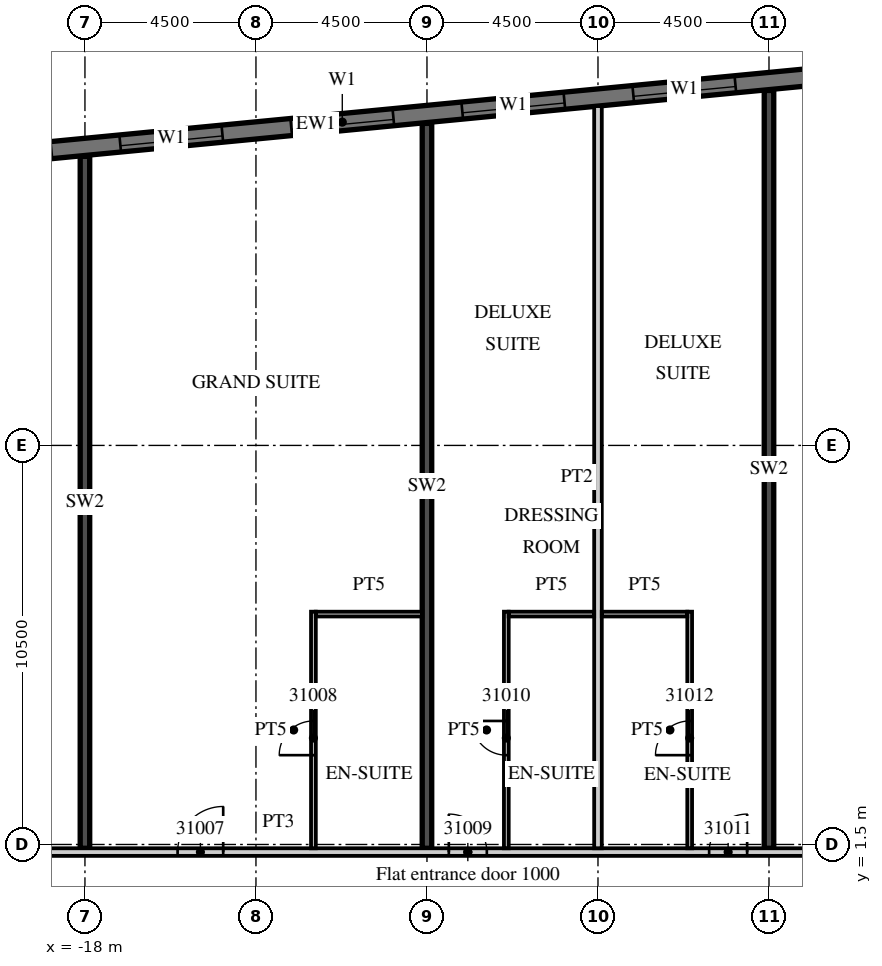
"""IFC4 building model, lengths in metres.
Left out: names, types, materials, properties, quantities, classifications, styles, units other than length and angle.
Written with IfcOpenShell. Run it as: python <this file> out.ifc"""

import sys

from ifc_helpers import new_model, si_unit, direction, frame, frame_2d, origin, place, context, subcontext, project, spatial, rectangle, extrude, element, fill, save


model = new_model("IFC4")
c1 = context("Model", 3, precision=1e-05, world=origin(), true_north=direction((0.0, 1.0)))
c2 = subcontext(c1, "Body", "Model", "MODEL_VIEW")
j1 = project(units=[si_unit("LENGTHUNIT", "METRE"), si_unit("PLANEANGLEUNIT", "RADIAN")], contexts=[c1])
p1 = place(None, origin())
s1 = spatial("IfcSite", under=j1, at=p1, CompositionType="ELEMENT")
p2 = place(p1, origin())
s2 = spatial("IfcBuilding", under=s1, at=p2, CompositionType="ELEMENT")
p3 = place(p2, frame((0.0, 0.0, 137.2)))
s3 = spatial("IfcBuildingStorey", under=s2, at=p3, CompositionType="ELEMENT", Elevation=137.2)
p4 = place(p3, frame((-18.0, 1.4, 0.0), z_axis=(0.0, 0.0, 1.0), x_axis=(0.0, 1.0, 0.0)))
e1 = element("IfcWall", 1, at=p4, inside=s3, PredefinedType="SHEAR", context=c2, shape_type="SweptSolid", body=[
    extrude(rectangle(XDim=18.207, YDim=0.25, at=frame_2d((9.104, 0.0))), origin(), (0.0, 0.0, 1.0), 3.3),
])
p5 = place(p3, frame((-9.0, 1.4, 0.0), z_axis=(0.0, 0.0, 1.0), x_axis=(0.0, 1.0, 0.0)))
e2 = element("IfcWall", 2, at=p5, inside=s3, PredefinedType="SHEAR", context=c2, shape_type="SweptSolid", body=[
    extrude(rectangle(XDim=19.073, YDim=0.25, at=frame_2d((9.537, 0.0))), origin(), (0.0, 0.0, 1.0), 3.3),
])
p6 = place(p3, frame((0.0, 1.4, 0.0), z_axis=(0.0, 0.0, 1.0), x_axis=(0.0, 1.0, 0.0)))
e3 = element("IfcWall", 3, at=p6, inside=s3, PredefinedType="SHEAR", context=c2, shape_type="SweptSolid", body=[
    extrude(rectangle(XDim=19.94, YDim=0.25, at=frame_2d((9.97, 0.0))), origin(), (0.0, 0.0, 1.0), 3.3),
])
p7 = place(p3, frame((13.521, 22.89, 0.0), z_axis=(0.0, 0.0, 1.0), x_axis=(-0.995396445054, -0.095843190545, 0.0)))
e4 = element("IfcWall", 4, at=p7, inside=s3, PredefinedType="SOLIDWALL", context=c2, shape_type="SweptSolid", body=[
    extrude(rectangle(XDim=51.114, YDim=0.45, at=frame_2d((25.557, 0.0))), origin(), (0.0, 0.0, 1.0), 3.02),
])
p8 = place(p7, frame((0.91, 0.0, 0.45)))
e5 = element("IfcOpeningElement", 5, at=p8, cuts=e4, PredefinedType="OPENING", context=c2, shape_type="SweptSolid", body=[
    extrude(rectangle(XDim=2.7, YDim=2.25, at=frame_2d((1.35, 1.125))), frame((0.0, 0.235, 0.0), z_axis=(0.0, -1.0, 0.0), x_axis=(1.0, 0.0, 0.0)), (0.0, 0.0, 1.0), 0.47),
])
p9 = place(p7, frame((5.431, 0.0, 0.45)))
e6 = element("IfcOpeningElement", 6, at=p9, cuts=e4, PredefinedType="OPENING", context=c2, shape_type="SweptSolid", body=[
    extrude(rectangle(XDim=2.7, YDim=2.25, at=frame_2d((1.35, 1.125))), frame((0.0, 0.235, 0.0), z_axis=(0.0, -1.0, 0.0), x_axis=(1.0, 0.0, 0.0)), (0.0, 0.0, 1.0), 0.47),
])
p10 = place(p7, frame((9.952, 0.0, 0.45)))
e7 = element("IfcOpeningElement", 7, at=p10, cuts=e4, PredefinedType="OPENING", context=c2, shape_type="SweptSolid", body=[
    extrude(rectangle(XDim=2.7, YDim=2.25, at=frame_2d((1.35, 1.125))), frame((0.0, 0.235, 0.0), z_axis=(0.0, -1.0, 0.0), x_axis=(1.0, 0.0, 0.0)), (0.0, 0.0, 1.0), 0.47),
])
p11 = place(p7, frame((14.473, 0.0, 0.45)))
e8 = element("IfcOpeningElement", 8, at=p11, cuts=e4, PredefinedType="OPENING", context=c2, shape_type="SweptSolid", body=[
    extrude(rectangle(XDim=2.7, YDim=2.25, at=frame_2d((1.35, 1.125))), frame((0.0, 0.235, 0.0), z_axis=(0.0, -1.0, 0.0), x_axis=(1.0, 0.0, 0.0)), (0.0, 0.0, 1.0), 0.47),
])
p12 = place(p7, frame((18.994, 0.0, 0.45)))
e9 = element("IfcOpeningElement", 9, at=p12, cuts=e4, PredefinedType="OPENING", context=c2, shape_type="SweptSolid", body=[
    extrude(rectangle(XDim=2.7, YDim=2.25, at=frame_2d((1.35, 1.125))), frame((0.0, 0.235, 0.0), z_axis=(0.0, -1.0, 0.0), x_axis=(1.0, 0.0, 0.0)), (0.0, 0.0, 1.0), 0.47),
])
p13 = place(p7, frame((23.514, 0.0, 0.45)))
e10 = element("IfcOpeningElement", 10, at=p13, cuts=e4, PredefinedType="OPENING", context=c2, shape_type="SweptSolid", body=[
    extrude(rectangle(XDim=2.7, YDim=2.25, at=frame_2d((1.35, 1.125))), frame((0.0, 0.235, 0.0), z_axis=(0.0, -1.0, 0.0), x_axis=(1.0, 0.0, 0.0)), (0.0, 0.0, 1.0), 0.47),
])
p14 = place(p7, frame((28.035, 0.0, 0.45)))
e11 = element("IfcOpeningElement", 11, at=p14, cuts=e4, PredefinedType="OPENING", context=c2, shape_type="SweptSolid", body=[
    extrude(rectangle(XDim=2.7, YDim=2.25, at=frame_2d((1.35, 1.125))), frame((0.0, 0.235, 0.0), z_axis=(0.0, -1.0, 0.0), x_axis=(1.0, 0.0, 0.0)), (0.0, 0.0, 1.0), 0.47),
])
p15 = place(p7, frame((32.556, 0.0, 0.45)))
e12 = element("IfcOpeningElement", 12, at=p15, cuts=e4, PredefinedType="OPENING", context=c2, shape_type="SweptSolid", body=[
    extrude(rectangle(XDim=2.7, YDim=2.25, at=frame_2d((1.35, 1.125))), frame((0.0, 0.235, 0.0), z_axis=(0.0, -1.0, 0.0), x_axis=(1.0, 0.0, 0.0)), (0.0, 0.0, 1.0), 0.47),
])
p16 = place(p7, frame((37.077, 0.0, 0.45)))
e13 = element("IfcOpeningElement", 13, at=p16, cuts=e4, PredefinedType="OPENING", context=c2, shape_type="SweptSolid", body=[
    extrude(rectangle(XDim=2.7, YDim=2.25, at=frame_2d((1.35, 1.125))), frame((0.0, 0.235, 0.0), z_axis=(0.0, -1.0, 0.0), x_axis=(1.0, 0.0, 0.0)), (0.0, 0.0, 1.0), 0.47),
])
p17 = place(p7, frame((41.598, 0.0, 0.45)))
e14 = element("IfcOpeningElement", 14, at=p17, cuts=e4, PredefinedType="OPENING", context=c2, shape_type="SweptSolid", body=[
    extrude(rectangle(XDim=2.7, YDim=2.25, at=frame_2d((1.35, 1.125))), frame((0.0, 0.235, 0.0), z_axis=(0.0, -1.0, 0.0), x_axis=(1.0, 0.0, 0.0)), (0.0, 0.0, 1.0), 0.47),
])
p18 = place(p7, frame((46.118, 0.0, 0.45)))
e15 = element("IfcOpeningElement", 15, at=p18, cuts=e4, PredefinedType="OPENING", context=c2, shape_type="SweptSolid", body=[
    extrude(rectangle(XDim=2.7, YDim=2.25, at=frame_2d((1.35, 1.125))), frame((0.0, 0.235, 0.0), z_axis=(0.0, -1.0, 0.0), x_axis=(1.0, 0.0, 0.0)), (0.0, 0.0, 1.0), 0.47),
])
p19 = place(p3, frame((-39.316, 1.3, 0.0), z_axis=(0.0, 0.0, 1.0), x_axis=(1.0, 0.0, 0.0)))
e16 = element("IfcWall", 16, at=p19, inside=s3, PredefinedType="PARTITIONING", context=c2, shape_type="SweptSolid", body=[
    extrude(rectangle(XDim=52.816, YDim=0.2, at=frame_2d((26.408, 0.0))), origin(), (0.0, 0.0, 1.0), 3.02),
])
p20 = place(p19, frame((0.15, 0.0, 0.0)))
e17 = element("IfcOpeningElement", 17, at=p20, cuts=e16, PredefinedType="OPENING", context=c2, shape_type="SweptSolid", body=[
    extrude(rectangle(XDim=0.9, YDim=2.1, at=frame_2d((0.45, 1.05))), frame((0.0, 0.11, 0.0), z_axis=(0.0, -1.0, 0.0), x_axis=(1.0, 0.0, 0.0)), (0.0, 0.0, 1.0), 0.22),
])
p21 = place(p19, frame((8.679, 0.0, 0.0)))
e18 = element("IfcOpeningElement", 18, at=p21, cuts=e16, PredefinedType="OPENING", context=c2, shape_type="SweptSolid", body=[
    extrude(rectangle(XDim=1.2, YDim=2.1, at=frame_2d((0.6, 1.05))), frame((0.0, 0.11, 0.0), z_axis=(0.0, -1.0, 0.0), x_axis=(1.0, 0.0, 0.0)), (0.0, 0.0, 1.0), 0.22),
])
p22 = place(p19, frame((17.678, 0.0, 0.0)))
e19 = element("IfcOpeningElement", 19, at=p22, cuts=e16, PredefinedType="OPENING", context=c2, shape_type="SweptSolid", body=[
    extrude(rectangle(XDim=1.2, YDim=2.1, at=frame_2d((0.6, 1.05))), frame((0.0, 0.11, 0.0), z_axis=(0.0, -1.0, 0.0), x_axis=(1.0, 0.0, 0.0)), (0.0, 0.0, 1.0), 0.22),
])
p23 = place(p19, frame((23.754, 0.0, 0.0)))
e20 = element("IfcOpeningElement", 20, at=p23, cuts=e16, PredefinedType="OPENING", context=c2, shape_type="SweptSolid", body=[
    extrude(rectangle(XDim=1.2, YDim=2.1, at=frame_2d((0.6, 1.05))), frame((0.0, 0.11, 0.0), z_axis=(0.0, -1.0, 0.0), x_axis=(1.0, 0.0, 0.0)), (0.0, 0.0, 1.0), 0.22),
])
p24 = place(p19, frame((30.891, 0.0, 0.0)))
e21 = element("IfcOpeningElement", 21, at=p24, cuts=e16, PredefinedType="OPENING", context=c2, shape_type="SweptSolid", body=[
    extrude(rectangle(XDim=1.0, YDim=2.1, at=frame_2d((0.5, 1.05))), frame((0.0, 0.11, 0.0), z_axis=(0.0, -1.0, 0.0), x_axis=(1.0, 0.0, 0.0)), (0.0, 0.0, 1.0), 0.22),
])
p25 = place(p19, frame((37.741, 0.0, 0.0)))
e22 = element("IfcOpeningElement", 22, at=p25, cuts=e16, PredefinedType="OPENING", context=c2, shape_type="SweptSolid", body=[
    extrude(rectangle(XDim=1.0, YDim=2.1, at=frame_2d((0.5, 1.05))), frame((0.0, 0.11, 0.0), z_axis=(0.0, -1.0, 0.0), x_axis=(1.0, 0.0, 0.0)), (0.0, 0.0, 1.0), 0.22),
])
p26 = place(p19, frame((41.754, 0.0, 0.0)))
e23 = element("IfcOpeningElement", 23, at=p26, cuts=e16, PredefinedType="OPENING", context=c2, shape_type="SweptSolid", body=[
    extrude(rectangle(XDim=1.2, YDim=2.1, at=frame_2d((0.6, 1.05))), frame((0.0, 0.11, 0.0), z_axis=(0.0, -1.0, 0.0), x_axis=(1.0, 0.0, 0.0)), (0.0, 0.0, 1.0), 0.22),
])
p27 = place(p19, frame((48.891, 0.0, 0.0)))
e24 = element("IfcOpeningElement", 24, at=p27, cuts=e16, PredefinedType="OPENING", context=c2, shape_type="SweptSolid", body=[
    extrude(rectangle(XDim=1.0, YDim=2.1, at=frame_2d((0.5, 1.05))), frame((0.0, 0.11, 0.0), z_axis=(0.0, -1.0, 0.0), x_axis=(1.0, 0.0, 0.0)), (0.0, 0.0, 1.0), 0.22),
])
p28 = place(p3, frame((-11.988, 1.4, 0.0), z_axis=(0.0, 0.0, 1.0), x_axis=(0.0, 1.0, 0.0)))
e25 = element("IfcWall", 25, at=p28, inside=s3, PredefinedType="PARTITIONING", context=c2, shape_type="SweptSolid", body=[
    extrude(rectangle(XDim=6.225, YDim=0.125, at=frame_2d((3.113, 0.0))), origin(), (0.0, 0.0, 1.0), 3.02),
])
p29 = place(p28, frame((2.45, 0.0, 0.0)))
e26 = element("IfcOpeningElement", 26, at=p29, cuts=e25, PredefinedType="OPENING", context=c2, shape_type="SweptSolid", body=[
    extrude(rectangle(XDim=0.9, YDim=2.1, at=frame_2d((0.45, 1.05))), frame((0.0, 0.073, 0.0), z_axis=(0.0, -1.0, 0.0), x_axis=(1.0, 0.0, 0.0)), (0.0, 0.0, 1.0), 0.145),
])
p30 = place(p3, frame((-11.925, 7.562, 0.0), z_axis=(0.0, 0.0, 1.0), x_axis=(1.0, 0.0, 0.0)))
e27 = element("IfcWall", 27, at=p30, inside=s3, PredefinedType="PARTITIONING", context=c2, shape_type="SweptSolid", body=[
    extrude(rectangle(XDim=2.8, YDim=0.125, at=frame_2d((1.4, 0.0))), origin(), (0.0, 0.0, 1.0), 3.02),
])
p31 = place(p3, frame((-4.5, 1.4, 0.0), z_axis=(0.0, 0.0, 1.0), x_axis=(0.0, 1.0, 0.0)))
e28 = element("IfcWall", 28, at=p31, inside=s3, PredefinedType="PARTITIONING", context=c2, shape_type="SweptSolid", body=[
    extrude(rectangle(XDim=19.529, YDim=0.2, at=frame_2d((9.765, 0.0))), origin(), (0.0, 0.0, 1.0), 3.02),
])
p32 = place(p3, frame((-6.912, 1.4, 0.0), z_axis=(0.0, 0.0, 1.0), x_axis=(0.0, 1.0, 0.0)))
e29 = element("IfcWall", 29, at=p32, inside=s3, PredefinedType="PARTITIONING", context=c2, shape_type="SweptSolid", body=[
    extrude(rectangle(XDim=6.225, YDim=0.125, at=frame_2d((3.113, 0.0))), origin(), (0.0, 0.0, 1.0), 3.02),
])
p33 = place(p32, frame((2.45, 0.0, 0.0)))
e30 = element("IfcOpeningElement", 30, at=p33, cuts=e29, PredefinedType="OPENING", context=c2, shape_type="SweptSolid", body=[
    extrude(rectangle(XDim=0.9, YDim=2.1, at=frame_2d((0.45, 1.05))), frame((0.0, 0.073, 0.0), z_axis=(0.0, -1.0, 0.0), x_axis=(1.0, 0.0, 0.0)), (0.0, 0.0, 1.0), 0.145),
])
p34 = place(p3, frame((-6.85, 7.562, 0.0), z_axis=(0.0, 0.0, 1.0), x_axis=(1.0, 0.0, 0.0)))
e31 = element("IfcWall", 31, at=p34, inside=s3, PredefinedType="PARTITIONING", context=c2, shape_type="SweptSolid", body=[
    extrude(rectangle(XDim=2.25, YDim=0.125, at=frame_2d((1.125, 0.0))), origin(), (0.0, 0.0, 1.0), 3.02),
])
p35 = place(p3, frame((-2.087, 1.4, 0.0), z_axis=(0.0, 0.0, 1.0), x_axis=(0.0, 1.0, 0.0)))
e32 = element("IfcWall", 32, at=p35, inside=s3, PredefinedType="PARTITIONING", context=c2, shape_type="SweptSolid", body=[
    extrude(rectangle(XDim=6.225, YDim=0.125, at=frame_2d((3.113, 0.0))), origin(), (0.0, 0.0, 1.0), 3.02),
])
p36 = place(p35, frame((2.45, 0.0, 0.0)))
e33 = element("IfcOpeningElement", 33, at=p36, cuts=e32, PredefinedType="OPENING", context=c2, shape_type="SweptSolid", body=[
    extrude(rectangle(XDim=0.9, YDim=2.1, at=frame_2d((0.45, 1.05))), frame((0.0, 0.073, 0.0), z_axis=(0.0, -1.0, 0.0), x_axis=(1.0, 0.0, 0.0)), (0.0, 0.0, 1.0), 0.145),
])
p37 = place(p3, frame((-4.4, 7.562, 0.0), z_axis=(0.0, 0.0, 1.0), x_axis=(1.0, 0.0, 0.0)))
e34 = element("IfcWall", 34, at=p37, inside=s3, PredefinedType="PARTITIONING", context=c2, shape_type="SweptSolid", body=[
    extrude(rectangle(XDim=2.25, YDim=0.125, at=frame_2d((1.125, 0.0))), origin(), (0.0, 0.0, 1.0), 3.02),
])
p38 = place(p11, origin())
e35 = element("IfcWindow", 35, at=p38, inside=s3, PartitioningType="SINGLE_PANEL", PredefinedType="WINDOW", context=c2, shape_type="SweptSolid", body=[
    extrude(rectangle(XDim=2.7, YDim=2.25, at=frame_2d((1.35, 1.125))), frame((0.0, 0.09, 0.0), z_axis=(0.0, -1.0, 0.0), x_axis=(1.0, 0.0, 0.0)), (0.0, 0.0, 1.0), 0.06),
])
fill(e8, e35)
p39 = place(p12, origin())
e36 = element("IfcWindow", 36, at=p39, inside=s3, PartitioningType="SINGLE_PANEL", PredefinedType="WINDOW", context=c2, shape_type="SweptSolid", body=[
    extrude(rectangle(XDim=2.7, YDim=2.25, at=frame_2d((1.35, 1.125))), frame((0.0, 0.09, 0.0), z_axis=(0.0, -1.0, 0.0), x_axis=(1.0, 0.0, 0.0)), (0.0, 0.0, 1.0), 0.06),
])
fill(e9, e36)
p40 = place(p13, origin())
e37 = element("IfcWindow", 37, at=p40, inside=s3, PartitioningType="SINGLE_PANEL", PredefinedType="WINDOW", context=c2, shape_type="SweptSolid", body=[
    extrude(rectangle(XDim=2.7, YDim=2.25, at=frame_2d((1.35, 1.125))), frame((0.0, 0.09, 0.0), z_axis=(0.0, -1.0, 0.0), x_axis=(1.0, 0.0, 0.0)), (0.0, 0.0, 1.0), 0.06),
])
fill(e10, e37)
p41 = place(p14, origin())
e38 = element("IfcWindow", 38, at=p41, inside=s3, PartitioningType="SINGLE_PANEL", PredefinedType="WINDOW", context=c2, shape_type="SweptSolid", body=[
    extrude(rectangle(XDim=2.7, YDim=2.25, at=frame_2d((1.35, 1.125))), frame((0.0, 0.09, 0.0), z_axis=(0.0, -1.0, 0.0), x_axis=(1.0, 0.0, 0.0)), (0.0, 0.0, 1.0), 0.06),
])
fill(e11, e38)
p42 = place(p23, origin())
e39 = element("IfcDoor", 39, at=p42, inside=s3, OperationType="SINGLE_SWING_RIGHT", PredefinedType="DOOR", context=c2, shape_type="SweptSolid", body=[
    extrude(rectangle(XDim=1.2, YDim=2.1, at=frame_2d((0.6, 1.05))), frame((0.0, 0.025, 0.0), z_axis=(0.0, -1.0, 0.0), x_axis=(1.0, 0.0, 0.0)), (0.0, 0.0, 1.0), 0.05),
])
fill(e20, e39)
p43 = place(p29, origin())
e40 = element("IfcDoor", 40, at=p43, inside=s3, OperationType="SINGLE_SWING_LEFT", PredefinedType="DOOR", context=c2, shape_type="SweptSolid", body=[
    extrude(rectangle(XDim=0.9, YDim=2.1, at=frame_2d((0.45, 1.05))), frame((0.0, 0.025, 0.0), z_axis=(0.0, -1.0, 0.0), x_axis=(1.0, 0.0, 0.0)), (0.0, 0.0, 1.0), 0.05),
])
fill(e26, e40)
p44 = place(p24, origin())
e41 = element("IfcDoor", 41, at=p44, inside=s3, OperationType="SINGLE_SWING_LEFT", PredefinedType="DOOR", context=c2, shape_type="SweptSolid", body=[
    extrude(rectangle(XDim=1.0, YDim=2.1, at=frame_2d((0.5, 1.05))), frame((0.0, 0.025, 0.0), z_axis=(0.0, -1.0, 0.0), x_axis=(1.0, 0.0, 0.0)), (0.0, 0.0, 1.0), 0.05),
])
fill(e21, e41)
p45 = place(p33, origin())
e42 = element("IfcDoor", 42, at=p45, inside=s3, OperationType="SINGLE_SWING_RIGHT", PredefinedType="DOOR", context=c2, shape_type="SweptSolid", body=[
    extrude(rectangle(XDim=0.9, YDim=2.1, at=frame_2d((0.45, 1.05))), frame((0.0, 0.025, 0.0), z_axis=(0.0, -1.0, 0.0), x_axis=(1.0, 0.0, 0.0)), (0.0, 0.0, 1.0), 0.05),
])
fill(e30, e42)
p46 = place(p25, origin())
e43 = element("IfcDoor", 43, at=p46, inside=s3, OperationType="SINGLE_SWING_RIGHT", PredefinedType="DOOR", context=c2, shape_type="SweptSolid", body=[
    extrude(rectangle(XDim=1.0, YDim=2.1, at=frame_2d((0.5, 1.05))), frame((0.0, 0.025, 0.0), z_axis=(0.0, -1.0, 0.0), x_axis=(1.0, 0.0, 0.0)), (0.0, 0.0, 1.0), 0.05),
])
fill(e22, e43)
p47 = place(p36, origin())
e44 = element("IfcDoor", 44, at=p47, inside=s3, OperationType="SINGLE_SWING_LEFT", PredefinedType="DOOR", context=c2, shape_type="SweptSolid", body=[
    extrude(rectangle(XDim=0.9, YDim=2.1, at=frame_2d((0.45, 1.05))), frame((0.0, 0.025, 0.0), z_axis=(0.0, -1.0, 0.0), x_axis=(1.0, 0.0, 0.0)), (0.0, 0.0, 1.0), 0.05),
])
fill(e33, e44)
save(model, sys.argv[1])
